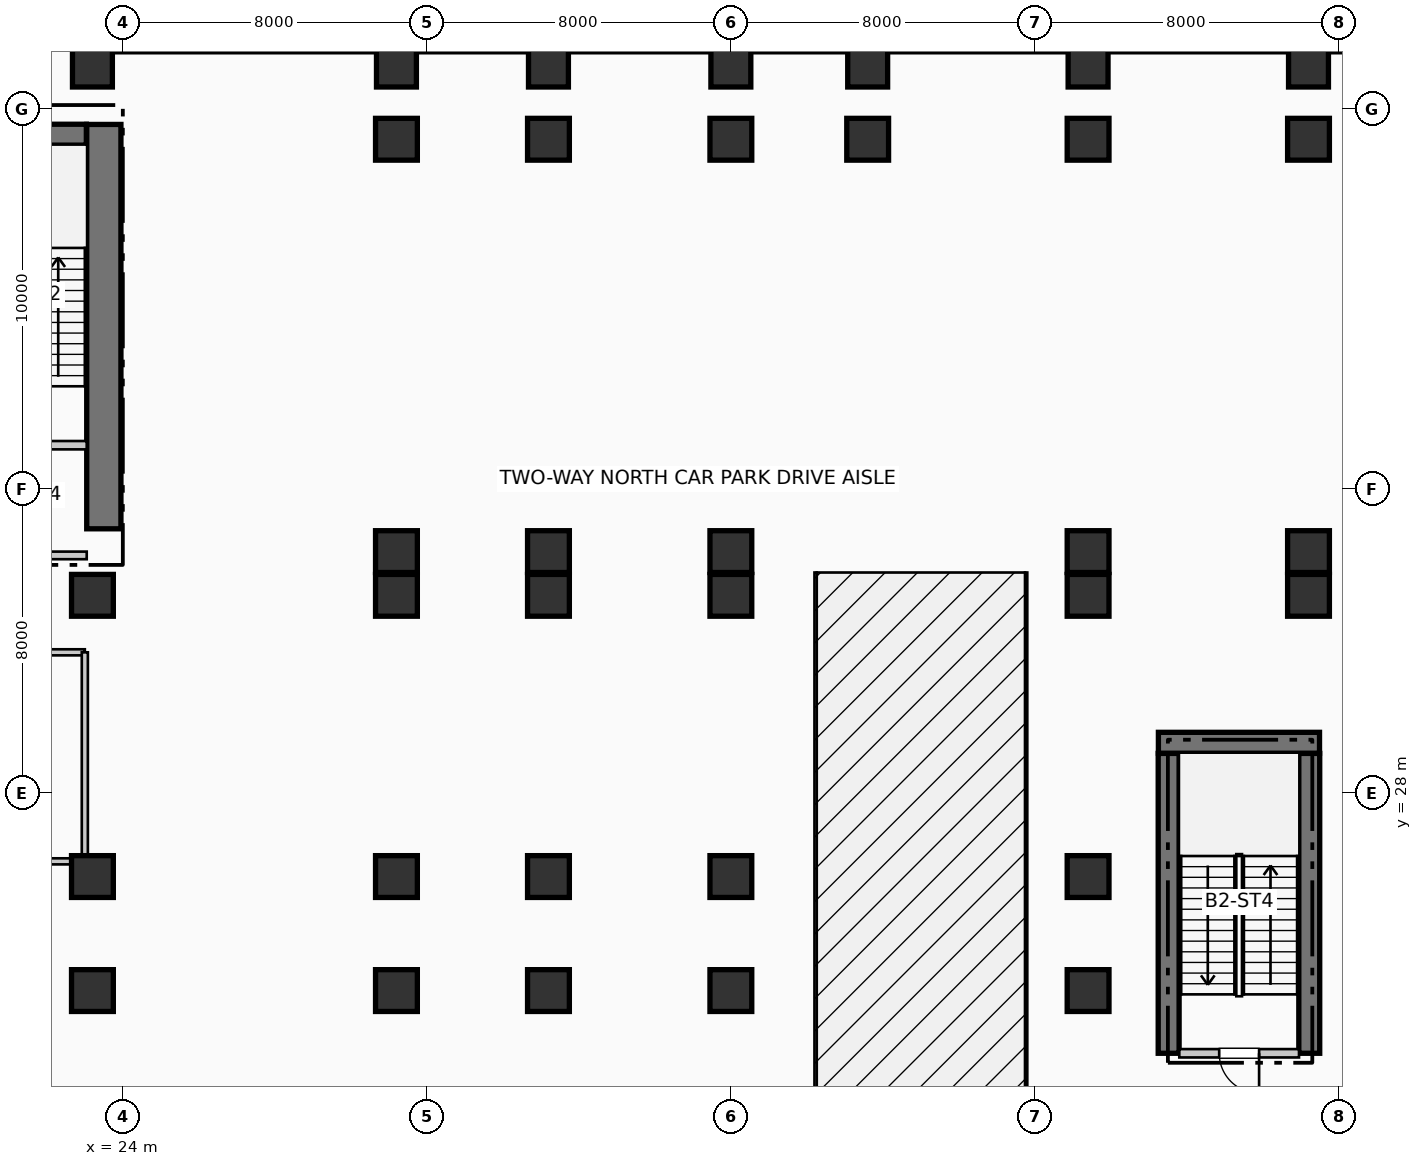
"""IFC4 building model, lengths in metres.
Left out: names, types, materials, properties, quantities, classifications, styles, units other than length and angle.
Written with IfcOpenShell. Run it as: python <this file> out.ifc"""

import sys

from ifc_helpers import new_model, si_unit, direction, frame, frame_2d, origin, origin_2d, place, context, subcontext, project, spatial, rectangle, extrude, element, fill, save


model = new_model("IFC4")
c1 = context("Model", 3, precision=1e-05, world=origin(), true_north=direction((0.0, 1.0)))
c2 = subcontext(c1, "Body", "Model", "MODEL_VIEW")
j1 = project(units=[si_unit("LENGTHUNIT", "METRE"), si_unit("PLANEANGLEUNIT", "RADIAN")], contexts=[c1])
p1 = place(None, origin())
s1 = spatial("IfcSite", under=j1, at=p1, CompositionType="ELEMENT")
p2 = place(p1, origin())
s2 = spatial("IfcBuilding", under=s1, at=p2, CompositionType="ELEMENT")
p3 = place(p2, frame((0.0, 0.0, -9.24)))
s3 = spatial("IfcBuildingStorey", under=s2, at=p3, CompositionType="ELEMENT", Elevation=-9.24)
p4 = place(p3, frame((23.5, 34.95, 0.0), z_axis=(0.0, 0.0, 1.0), x_axis=(0.0, 1.0, 0.0)))
e1 = element("IfcWall", 1, at=p4, inside=s3, PredefinedType="SHEAR", context=c2, shape_type="SweptSolid", body=[
    extrude(rectangle(XDim=10.64, YDim=0.9, at=frame_2d((5.32, 0.0))), origin(), (0.0, 0.0, 1.0), 4.62),
])
p5 = place(p3, frame((19.35, 45.32, 0.0), z_axis=(0.0, 0.0, 1.0), x_axis=(1.0, 0.0, 0.0)))
e2 = element("IfcWall", 2, at=p5, inside=s3, PredefinedType="SHEAR", context=c2, shape_type="SweptSolid", body=[
    extrude(rectangle(XDim=3.69, YDim=0.55, at=frame_2d((1.845, 0.0))), origin(), (0.0, 0.0, 1.0), 4.62),
])
for number, where, z_axis, x_axis in (
    (3, (51.52, 21.15, 0.0), (0.0, 0.0, 1.0), (0.0, 1.0, 0.0)),
    (4, (55.22, 21.15, 0.0), (0.0, 0.0, 1.0), (0.0, 1.0, 0.0)),
):
    element("IfcWall", number, at=place(p3, frame(where, z_axis=z_axis, x_axis=x_axis)), inside=s3, PredefinedType="SHEAR", context=c2, shape_type="SweptSolid", body=[
        extrude(rectangle(XDim=7.89, YDim=0.55, at=frame_2d((3.945, 0.0))), origin(), (0.0, 0.0, 1.0), 4.62),
    ])
p6 = place(p3, frame((51.25, 29.32, 0.0), z_axis=(0.0, 0.0, 1.0), x_axis=(1.0, 0.0, 0.0)))
e5 = element("IfcWall", 5, at=p6, inside=s3, PredefinedType="SHEAR", context=c2, shape_type="SweptSolid", body=[
    extrude(rectangle(XDim=4.24, YDim=0.55, at=frame_2d((2.12, 0.0))), origin(), (0.0, 0.0, 1.0), 4.62),
])
for number, where, z_axis, x_axis in (
    (6, (23.2, 22.8, 0.0), (0.0, 0.0, 1.0), (1.0, 0.0, 0.0)),
    (7, (23.2, 25.8, 0.0), (0.0, 0.0, 1.0), (1.0, 0.0, 0.0)),
    (8, (23.2, 33.2, 0.0), (0.0, 0.0, 1.0), (1.0, 0.0, 0.0)),
):
    element("IfcColumn", number, at=place(p3, frame(where, z_axis=z_axis, x_axis=x_axis)), inside=s3, PredefinedType="COLUMN", context=c2, shape_type="SweptSolid", body=[
        extrude(rectangle(XDim=1.1, YDim=1.1, at=origin_2d()), origin(), (0.0, 0.0, 1.0), 4.62),
    ])
p7 = place(p3, frame((23.2, 47.1, 0.0), z_axis=(0.0, 0.0, 1.0), x_axis=(1.0, 0.0, 0.0)))
e9 = element("IfcColumn", 9, at=p7, inside=s3, PredefinedType="COLUMN", context=c2, shape_type="SweptSolid", body=[
    extrude(rectangle(XDim=1.05, YDim=1.05, at=origin_2d()), origin(), (0.0, 0.0, 1.0), 4.62),
])
for number, where, z_axis, x_axis in (
    (10, (31.2, 22.8, 0.0), (0.0, 0.0, 1.0), (1.0, 0.0, 0.0)),
    (11, (31.2, 25.8, 0.0), (0.0, 0.0, 1.0), (1.0, 0.0, 0.0)),
    (12, (31.2, 33.2, 0.0), (0.0, 0.0, 1.0), (1.0, 0.0, 0.0)),
    (13, (31.2, 34.35, 0.0), (0.0, 0.0, 1.0), (1.0, 0.0, 0.0)),
    (14, (31.2, 45.2, 0.0), (0.0, 0.0, 1.0), (1.0, 0.0, 0.0)),
):
    element("IfcColumn", number, at=place(p3, frame(where, z_axis=z_axis, x_axis=x_axis)), inside=s3, PredefinedType="COLUMN", context=c2, shape_type="SweptSolid", body=[
        extrude(rectangle(XDim=1.1, YDim=1.1, at=origin_2d()), origin(), (0.0, 0.0, 1.0), 4.62),
    ])
p8 = place(p3, frame((31.2, 47.1, 0.0), z_axis=(0.0, 0.0, 1.0), x_axis=(1.0, 0.0, 0.0)))
e15 = element("IfcColumn", 15, at=p8, inside=s3, PredefinedType="COLUMN", context=c2, shape_type="SweptSolid", body=[
    extrude(rectangle(XDim=1.05, YDim=1.05, at=origin_2d()), origin(), (0.0, 0.0, 1.0), 4.62),
])
for number, where, z_axis, x_axis in (
    (16, (35.2, 22.8, 0.0), (0.0, 0.0, 1.0), (1.0, 0.0, 0.0)),
    (17, (35.2, 25.8, 0.0), (0.0, 0.0, 1.0), (1.0, 0.0, 0.0)),
    (18, (35.2, 33.2, 0.0), (0.0, 0.0, 1.0), (1.0, 0.0, 0.0)),
    (19, (35.2, 34.35, 0.0), (0.0, 0.0, 1.0), (1.0, 0.0, 0.0)),
    (20, (35.2, 45.2, 0.0), (0.0, 0.0, 1.0), (1.0, 0.0, 0.0)),
):
    element("IfcColumn", number, at=place(p3, frame(where, z_axis=z_axis, x_axis=x_axis)), inside=s3, PredefinedType="COLUMN", context=c2, shape_type="SweptSolid", body=[
        extrude(rectangle(XDim=1.1, YDim=1.1, at=origin_2d()), origin(), (0.0, 0.0, 1.0), 4.62),
    ])
p9 = place(p3, frame((35.2, 47.1, 0.0), z_axis=(0.0, 0.0, 1.0), x_axis=(1.0, 0.0, 0.0)))
e21 = element("IfcColumn", 21, at=p9, inside=s3, PredefinedType="COLUMN", context=c2, shape_type="SweptSolid", body=[
    extrude(rectangle(XDim=1.05, YDim=1.05, at=origin_2d()), origin(), (0.0, 0.0, 1.0), 4.62),
])
for number, where, z_axis, x_axis in (
    (22, (40.0, 22.8, 0.0), (0.0, 0.0, 1.0), (1.0, 0.0, 0.0)),
    (23, (40.0, 25.8, 0.0), (0.0, 0.0, 1.0), (1.0, 0.0, 0.0)),
    (24, (40.0, 33.2, 0.0), (0.0, 0.0, 1.0), (1.0, 0.0, 0.0)),
    (25, (40.0, 34.35, 0.0), (0.0, 0.0, 1.0), (1.0, 0.0, 0.0)),
    (26, (40.0, 45.2, 0.0), (0.0, 0.0, 1.0), (1.0, 0.0, 0.0)),
):
    element("IfcColumn", number, at=place(p3, frame(where, z_axis=z_axis, x_axis=x_axis)), inside=s3, PredefinedType="COLUMN", context=c2, shape_type="SweptSolid", body=[
        extrude(rectangle(XDim=1.1, YDim=1.1, at=origin_2d()), origin(), (0.0, 0.0, 1.0), 4.62),
    ])
p10 = place(p3, frame((40.0, 47.1, 0.0), z_axis=(0.0, 0.0, 1.0), x_axis=(1.0, 0.0, 0.0)))
e27 = element("IfcColumn", 27, at=p10, inside=s3, PredefinedType="COLUMN", context=c2, shape_type="SweptSolid", body=[
    extrude(rectangle(XDim=1.05, YDim=1.05, at=origin_2d()), origin(), (0.0, 0.0, 1.0), 4.62),
])
p11 = place(p3, frame((43.6, 45.2, 0.0), z_axis=(0.0, 0.0, 1.0), x_axis=(1.0, 0.0, 0.0)))
e28 = element("IfcColumn", 28, at=p11, inside=s3, PredefinedType="COLUMN", context=c2, shape_type="SweptSolid", body=[
    extrude(rectangle(XDim=1.1, YDim=1.1, at=origin_2d()), origin(), (0.0, 0.0, 1.0), 4.62),
])
p12 = place(p3, frame((43.6, 47.1, 0.0), z_axis=(0.0, 0.0, 1.0), x_axis=(1.0, 0.0, 0.0)))
e29 = element("IfcColumn", 29, at=p12, inside=s3, PredefinedType="COLUMN", context=c2, shape_type="SweptSolid", body=[
    extrude(rectangle(XDim=1.05, YDim=1.05, at=origin_2d()), origin(), (0.0, 0.0, 1.0), 4.62),
])
for number, where, z_axis, x_axis in (
    (30, (49.4, 22.8, 0.0), (0.0, 0.0, 1.0), (1.0, 0.0, 0.0)),
    (31, (49.4, 25.8, 0.0), (0.0, 0.0, 1.0), (1.0, 0.0, 0.0)),
    (32, (49.4, 33.2, 0.0), (0.0, 0.0, 1.0), (1.0, 0.0, 0.0)),
    (33, (49.4, 34.35, 0.0), (0.0, 0.0, 1.0), (1.0, 0.0, 0.0)),
    (34, (49.4, 45.2, 0.0), (0.0, 0.0, 1.0), (1.0, 0.0, 0.0)),
):
    element("IfcColumn", number, at=place(p3, frame(where, z_axis=z_axis, x_axis=x_axis)), inside=s3, PredefinedType="COLUMN", context=c2, shape_type="SweptSolid", body=[
        extrude(rectangle(XDim=1.1, YDim=1.1, at=origin_2d()), origin(), (0.0, 0.0, 1.0), 4.62),
    ])
p13 = place(p3, frame((49.4, 47.1, 0.0), z_axis=(0.0, 0.0, 1.0), x_axis=(1.0, 0.0, 0.0)))
e35 = element("IfcColumn", 35, at=p13, inside=s3, PredefinedType="COLUMN", context=c2, shape_type="SweptSolid", body=[
    extrude(rectangle(XDim=1.05, YDim=1.05, at=origin_2d()), origin(), (0.0, 0.0, 1.0), 4.62),
])
for number, where, z_axis, x_axis in (
    (36, (55.2, 33.2, 0.0), (0.0, 0.0, 1.0), (1.0, 0.0, 0.0)),
    (37, (55.2, 34.35, 0.0), (0.0, 0.0, 1.0), (1.0, 0.0, 0.0)),
    (38, (55.2, 45.2, 0.0), (0.0, 0.0, 1.0), (1.0, 0.0, 0.0)),
):
    element("IfcColumn", number, at=place(p3, frame(where, z_axis=z_axis, x_axis=x_axis)), inside=s3, PredefinedType="COLUMN", context=c2, shape_type="SweptSolid", body=[
        extrude(rectangle(XDim=1.1, YDim=1.1, at=origin_2d()), origin(), (0.0, 0.0, 1.0), 4.62),
    ])
p14 = place(p3, frame((55.2, 47.1, 0.0), z_axis=(0.0, 0.0, 1.0), x_axis=(1.0, 0.0, 0.0)))
e39 = element("IfcColumn", 39, at=p14, inside=s3, PredefinedType="COLUMN", context=c2, shape_type="SweptSolid", body=[
    extrude(rectangle(XDim=1.05, YDim=1.05, at=origin_2d()), origin(), (0.0, 0.0, 1.0), 4.62),
])
p15 = place(p3, frame((19.9, 37.15, 0.0), z_axis=(0.0, 0.0, 1.0), x_axis=(1.0, 0.0, 0.0)))
e40 = element("IfcWall", 40, at=p15, inside=s3, PredefinedType="PARTITIONING", context=c2, shape_type="SweptSolid", body=[
    extrude(rectangle(XDim=3.15, YDim=0.22, at=frame_2d((1.575, 0.0))), origin(), (0.0, 0.0, 1.0), 4.27),
])
p16 = place(p15, frame((2.05, 0.0, 0.0), z_axis=(0.0, 0.0, 1.0), x_axis=(-1.0, 0.0, 0.0)))
e41 = element("IfcOpeningElement", 41, at=p16, cuts=e40, PredefinedType="OPENING", context=c2, shape_type="SweptSolid", body=[
    extrude(rectangle(XDim=1.05, YDim=2.15, at=frame_2d((0.525, 1.075))), frame((0.0, 0.12, 0.0), z_axis=(0.0, -1.0, 0.0), x_axis=(1.0, 0.0, 0.0)), (0.0, 0.0, 1.0), 0.24),
])
p17 = place(p3, frame((19.8, 34.25, 0.0), z_axis=(0.0, 0.0, 1.0), x_axis=(1.0, 0.0, 0.0)))
e42 = element("IfcWall", 42, at=p17, inside=s3, PredefinedType="PARTITIONING", context=c2, shape_type="SweptSolid", body=[
    extrude(rectangle(XDim=3.25, YDim=0.2, at=frame_2d((1.625, 0.0))), origin(), (0.0, 0.0, 1.0), 4.27),
])
p18 = place(p17, frame((2.15, 0.0, 0.0), z_axis=(0.0, 0.0, 1.0), x_axis=(-1.0, 0.0, 0.0)))
e43 = element("IfcOpeningElement", 43, at=p18, cuts=e42, PredefinedType="OPENING", context=c2, shape_type="SweptSolid", body=[
    extrude(rectangle(XDim=1.1, YDim=2.15, at=frame_2d((0.55, 1.075))), frame((0.0, 0.11, 0.0), z_axis=(0.0, -1.0, 0.0), x_axis=(1.0, 0.0, 0.0)), (0.0, 0.0, 1.0), 0.22),
])
p19 = place(p3, frame((51.8, 21.15, 0.0), z_axis=(0.0, 0.0, 1.0), x_axis=(1.0, 0.0, 0.0)))
e44 = element("IfcWall", 44, at=p19, inside=s3, PredefinedType="PARTITIONING", context=c2, shape_type="SweptSolid", body=[
    extrude(rectangle(XDim=3.15, YDim=0.22, at=frame_2d((1.575, 0.0))), origin(), (0.0, 0.0, 1.0), 4.27),
])
p20 = place(p19, frame((2.1, 0.0, 0.0), z_axis=(0.0, 0.0, 1.0), x_axis=(-1.0, 0.0, 0.0)))
e45 = element("IfcOpeningElement", 45, at=p20, cuts=e44, PredefinedType="OPENING", context=c2, shape_type="SweptSolid", body=[
    extrude(rectangle(XDim=1.05, YDim=2.15, at=frame_2d((0.525, 1.075))), frame((0.0, 0.12, 0.0), z_axis=(0.0, -1.0, 0.0), x_axis=(1.0, 0.0, 0.0)), (0.0, 0.0, 1.0), 0.24),
])
p21 = place(p3, frame((9.0, 26.2, 0.0), z_axis=(0.0, 0.0, 1.0), x_axis=(1.0, 0.0, 0.0)))
e46 = element("IfcWall", 46, at=p21, inside=s3, PredefinedType="PARTITIONING", context=c2, shape_type="SweptSolid", body=[
    extrude(rectangle(XDim=14.0, YDim=0.16, at=frame_2d((7.0, 0.0))), origin(), (0.0, 0.0, 1.0), 3.455),
])
p22 = place(p21, frame((1.0, 0.0, 0.0)))
e47 = element("IfcOpeningElement", 47, at=p22, cuts=e46, PredefinedType="OPENING", context=c2, shape_type="SweptSolid", body=[
    extrude(rectangle(XDim=0.95, YDim=2.1, at=frame_2d((0.475, 1.05))), frame((0.0, 0.09, 0.0), z_axis=(0.0, -1.0, 0.0), x_axis=(1.0, 0.0, 0.0)), (0.0, 0.0, 1.0), 0.18),
])
p23 = place(p21, frame((9.5, 0.0, 0.0)))
e48 = element("IfcOpeningElement", 48, at=p23, cuts=e46, PredefinedType="OPENING", context=c2, shape_type="SweptSolid", body=[
    extrude(rectangle(XDim=0.95, YDim=2.1, at=frame_2d((0.475, 1.05))), frame((0.0, 0.09, 0.0), z_axis=(0.0, -1.0, 0.0), x_axis=(1.0, 0.0, 0.0)), (0.0, 0.0, 1.0), 0.18),
])
p24 = place(p3, frame((9.0, 31.7, 0.0), z_axis=(0.0, 0.0, 1.0), x_axis=(1.0, 0.0, 0.0)))
e49 = element("IfcWall", 49, at=p24, inside=s3, PredefinedType="PARTITIONING", context=c2, shape_type="SweptSolid", body=[
    extrude(rectangle(XDim=14.0, YDim=0.16, at=frame_2d((7.0, 0.0))), origin(), (0.0, 0.0, 1.0), 4.27),
])
p25 = place(p3, frame((23.0, 26.2, 0.0), z_axis=(0.0, 0.0, 1.0), x_axis=(0.0, 1.0, 0.0)))
e50 = element("IfcWall", 50, at=p25, inside=s3, PredefinedType="PARTITIONING", context=c2, shape_type="SweptSolid", body=[
    extrude(rectangle(XDim=5.5, YDim=0.16, at=frame_2d((2.75, 0.0))), origin(), (0.0, 0.0, 1.0), 3.455),
])
p26 = place(p20, origin())
e51 = element("IfcDoor", 51, at=p26, inside=s3, OperationType="SINGLE_SWING_RIGHT", PredefinedType="DOOR", context=c2, shape_type="SweptSolid", body=[
    extrude(rectangle(XDim=1.05, YDim=2.15, at=frame_2d((0.525, 1.075))), frame((0.0, 0.025, 0.0), z_axis=(0.0, -1.0, 0.0), x_axis=(1.0, 0.0, 0.0)), (0.0, 0.0, 1.0), 0.05),
])
fill(e45, e51)
save(model, sys.argv[1])
